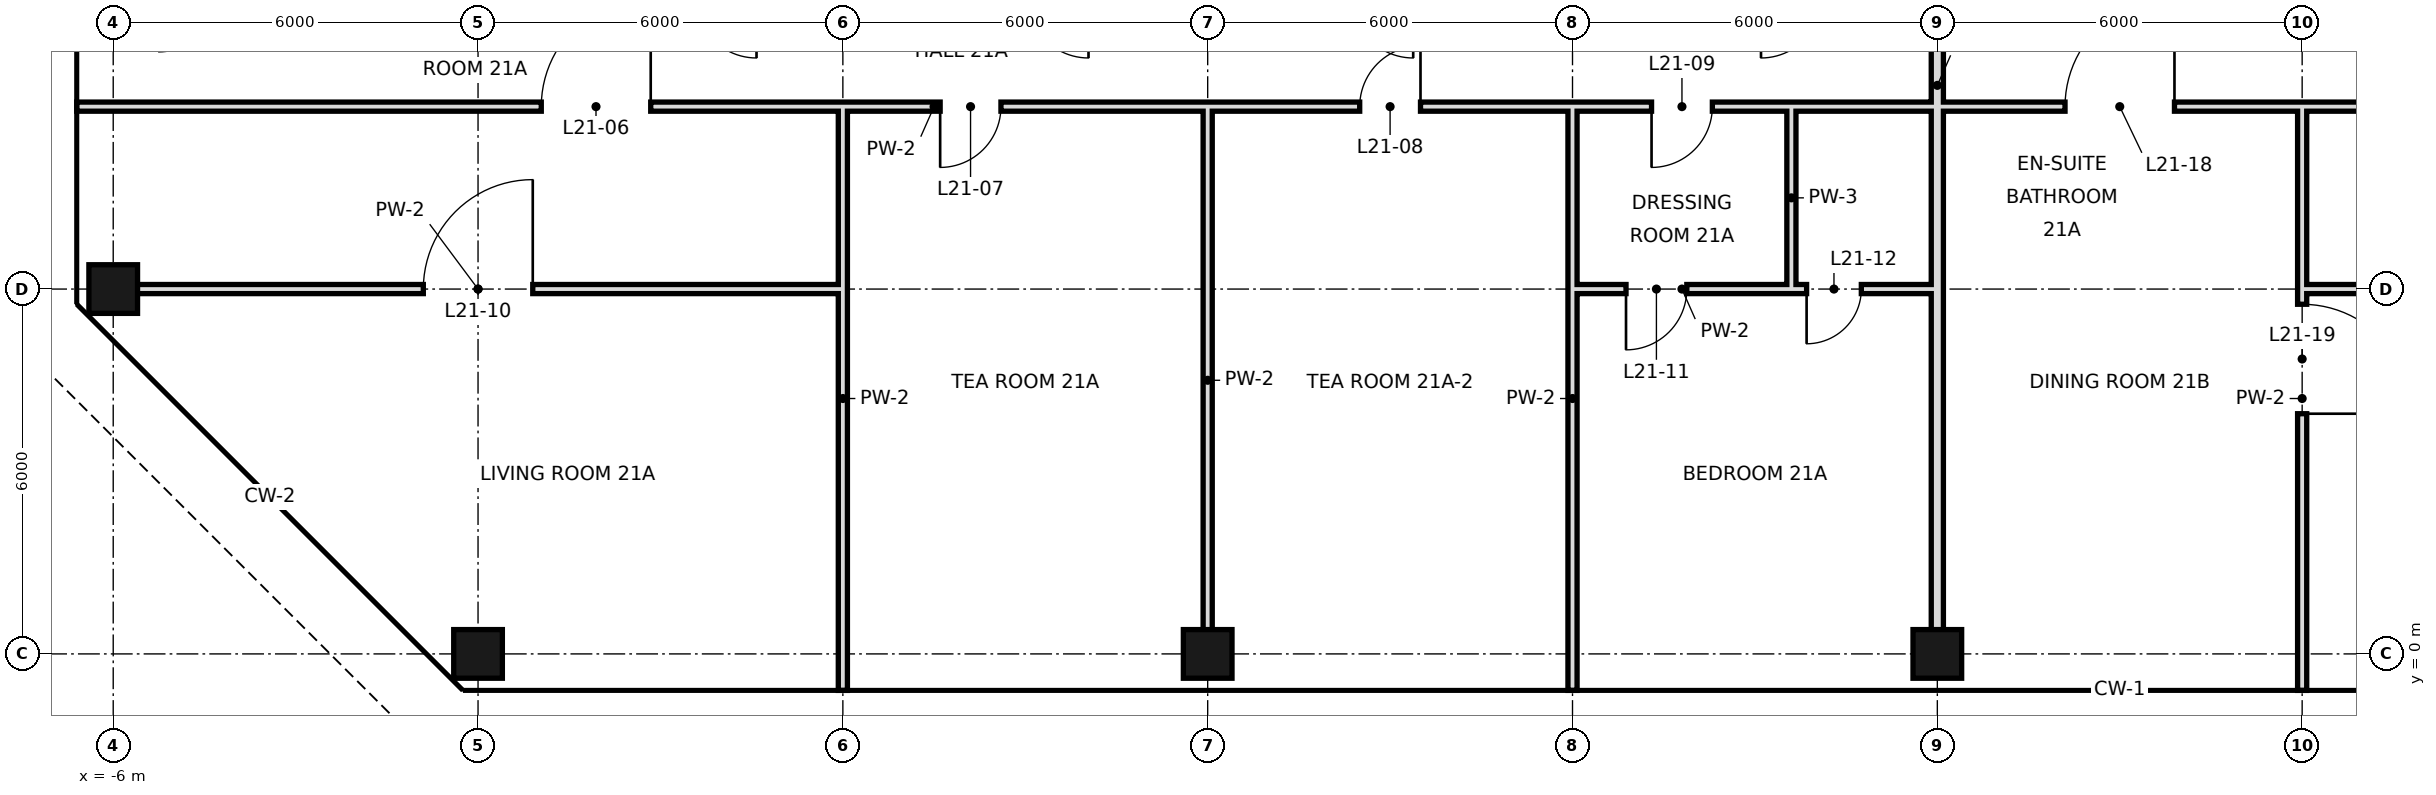
"""IFC4 building model, lengths in metres.
Left out: names, types, materials, properties, quantities, classifications, styles, units other than length and angle.
Written with IfcOpenShell. Run it as: python <this file> out.ifc"""

import sys

from ifc_helpers import new_model, si_unit, direction, frame, frame_2d, origin, origin_2d, place, context, subcontext, project, spatial, rectangle, hollow_rectangle, extrude, element, fill, save


model = new_model("IFC4")
c1 = context("Model", 3, precision=1e-05, world=origin(), true_north=direction((0.0, 1.0)))
c2 = subcontext(c1, "Body", "Model", "MODEL_VIEW")
j1 = project(units=[si_unit("LENGTHUNIT", "METRE"), si_unit("PLANEANGLEUNIT", "RADIAN")], contexts=[c1])
p1 = place(None, origin())
s1 = spatial("IfcSite", under=j1, at=p1, CompositionType="ELEMENT")
p2 = place(p1, origin())
s2 = spatial("IfcBuilding", under=s1, at=p2, CompositionType="ELEMENT")
p3 = place(p2, frame((0.0, 0.0, 99.8)))
s3 = spatial("IfcBuildingStorey", under=s2, at=p3, CompositionType="ELEMENT", Elevation=99.8)
for number, where, z_axis, x_axis in (
    (1, (-6.0, 6.0, 0.0), (0.0, 0.0, 1.0), (1.0, 0.0, 0.0)),
    (2, (0.0, 0.0, 0.0), (0.0, 0.0, 1.0), (1.0, 0.0, 0.0)),
    (3, (12.0, 0.0, 0.0), (0.0, 0.0, 1.0), (1.0, 0.0, 0.0)),
    (4, (24.0, 0.0, 0.0), (0.0, 0.0, 1.0), (1.0, 0.0, 0.0)),
):
    element("IfcColumn", number, at=place(p3, frame(where, z_axis=z_axis, x_axis=x_axis)), inside=s3, PredefinedType="COLUMN", context=c2, shape_type="SweptSolid", body=[
        extrude(hollow_rectangle(XDim=0.8, YDim=0.8, WallThickness=0.04, at=origin_2d()), origin(), (0.0, 0.0, 1.0), 3.6),
    ])
p4 = place(p3, frame((12.0, 0.0, 0.0), z_axis=(0.0, 0.0, 1.0), x_axis=(0.0, 1.0, 0.0)))
e5 = element("IfcWall", 5, at=p4, inside=s3, PredefinedType="PARTITIONING", context=c2, shape_type="SweptSolid", body=[
    extrude(rectangle(XDim=9.0, YDim=0.15, at=frame_2d((4.5, 0.0))), origin(), (0.0, 0.0, 1.0), 2.72),
])
p5 = place(p3, frame((18.0, -0.6, 0.0), z_axis=(0.0, 0.0, 1.0), x_axis=(0.0, 1.0, 0.0)))
e6 = element("IfcWall", 6, at=p5, inside=s3, PredefinedType="PARTITIONING", context=c2, shape_type="SweptSolid", body=[
    extrude(rectangle(XDim=9.6, YDim=0.15, at=frame_2d((4.8, 0.0))), origin(), (0.0, 0.0, 1.0), 2.72),
])
p6 = place(p3, frame((21.6, 6.0, 0.0), z_axis=(0.0, 0.0, 1.0), x_axis=(0.0, 1.0, 0.0)))
e7 = element("IfcWall", 7, at=p6, inside=s3, PredefinedType="PARTITIONING", context=c2, shape_type="SweptSolid", body=[
    extrude(rectangle(XDim=3.0, YDim=0.15, at=frame_2d((1.5, 0.0))), origin(), (0.0, 0.0, 1.0), 3.42),
])
p7 = place(p3, frame((24.0, 0.0, 0.0), z_axis=(0.0, 0.0, 1.0), x_axis=(0.0, 1.0, 0.0)))
e8 = element("IfcWall", 8, at=p7, inside=s3, PredefinedType="SOLIDWALL", context=c2, shape_type="SweptSolid", body=[
    extrude(rectangle(XDim=18.7, YDim=0.2, at=frame_2d((9.35, 0.0))), origin(), (0.0, 0.0, 1.0), 2.72),
])
p8 = place(p3, frame((30.0, -0.6, 0.0), z_axis=(0.0, 0.0, 1.0), x_axis=(0.0, 1.0, 0.0)))
e9 = element("IfcWall", 9, at=p8, inside=s3, PredefinedType="PARTITIONING", context=c2, shape_type="SweptSolid", body=[
    extrude(rectangle(XDim=9.6, YDim=0.15, at=frame_2d((4.8, 0.0))), origin(), (0.0, 0.0, 1.0), 3.42),
])
p9 = place(p8, frame((4.55, 0.0, 0.0)))
e10 = element("IfcOpeningElement", 10, at=p9, cuts=e9, PredefinedType="OPENING", context=c2, shape_type="SweptSolid", body=[
    extrude(rectangle(XDim=1.8, YDim=2.4, at=frame_2d((0.9, 1.2))), frame((0.0, 0.085, 0.0), z_axis=(0.0, -1.0, 0.0), x_axis=(1.0, 0.0, 0.0)), (0.0, 0.0, 1.0), 0.17),
])
p10 = place(p3, frame((6.0, -0.6, 0.0), z_axis=(0.0, 0.0, 1.0), x_axis=(0.0, 1.0, 0.0)))
e11 = element("IfcWall", 11, at=p10, inside=s3, PredefinedType="PARTITIONING", context=c2, shape_type="SweptSolid", body=[
    extrude(rectangle(XDim=9.6, YDim=0.15, at=frame_2d((4.8, 0.0))), origin(), (0.0, 0.0, 1.0), 2.72),
])
p11 = place(p3, frame((-6.0, 6.0, 0.0), z_axis=(0.0, 0.0, 1.0), x_axis=(1.0, 0.0, 0.0)))
e12 = element("IfcWall", 12, at=p11, inside=s3, PredefinedType="PARTITIONING", context=c2, shape_type="SweptSolid", body=[
    extrude(rectangle(XDim=12.0, YDim=0.15, at=frame_2d((6.0, 0.0))), origin(), (0.0, 0.0, 1.0), 2.97),
])
p12 = place(p11, frame((5.1, 0.0, 0.0)))
e13 = element("IfcOpeningElement", 13, at=p12, cuts=e12, PredefinedType="OPENING", context=c2, shape_type="SweptSolid", body=[
    extrude(rectangle(XDim=1.8, YDim=2.4, at=frame_2d((0.9, 1.2))), frame((0.0, 0.085, 0.0), z_axis=(0.0, -1.0, 0.0), x_axis=(1.0, 0.0, 0.0)), (0.0, 0.0, 1.0), 0.17),
])
p13 = place(p3, frame((18.0, 6.0, 0.0), z_axis=(0.0, 0.0, 1.0), x_axis=(1.0, 0.0, 0.0)))
e14 = element("IfcWall", 14, at=p13, inside=s3, PredefinedType="PARTITIONING", context=c2, shape_type="SweptSolid", body=[
    extrude(rectangle(XDim=3.6, YDim=0.15, at=frame_2d((1.8, 0.0))), origin(), (0.0, 0.0, 1.0), 2.97),
])
p14 = place(p13, frame((0.88, 0.0, 0.0)))
e15 = element("IfcOpeningElement", 15, at=p14, cuts=e14, PredefinedType="OPENING", context=c2, shape_type="SweptSolid", body=[
    extrude(rectangle(XDim=1.0, YDim=2.4, at=frame_2d((0.5, 1.2))), frame((0.0, 0.085, 0.0), z_axis=(0.0, -1.0, 0.0), x_axis=(1.0, 0.0, 0.0)), (0.0, 0.0, 1.0), 0.17),
])
p15 = place(p3, frame((30.0, 6.0, 0.0), z_axis=(0.0, 0.0, 1.0), x_axis=(1.0, 0.0, 0.0)))
e16 = element("IfcWall", 16, at=p15, inside=s3, PredefinedType="PARTITIONING", context=c2, shape_type="SweptSolid", body=[
    extrude(rectangle(XDim=12.0, YDim=0.15, at=frame_2d((6.0, 0.0))), origin(), (0.0, 0.0, 1.0), 2.72),
])
p16 = place(p3, frame((21.6, 6.0, 0.0), z_axis=(0.0, 0.0, 1.0), x_axis=(1.0, 0.0, 0.0)))
e17 = element("IfcWall", 17, at=p16, inside=s3, PredefinedType="PARTITIONING", context=c2, shape_type="SweptSolid", body=[
    extrude(rectangle(XDim=2.4, YDim=0.15, at=frame_2d((1.2, 0.0))), origin(), (0.0, 0.0, 1.0), 2.97),
])
p17 = place(p16, frame((0.25, 0.0, 0.0)))
e18 = element("IfcOpeningElement", 18, at=p17, cuts=e17, PredefinedType="OPENING", context=c2, shape_type="SweptSolid", body=[
    extrude(rectangle(XDim=0.9, YDim=2.4, at=frame_2d((0.45, 1.2))), frame((0.0, 0.085, 0.0), z_axis=(0.0, -1.0, 0.0), x_axis=(1.0, 0.0, 0.0)), (0.0, 0.0, 1.0), 0.17),
])
p18 = place(p3, frame((-6.6, 9.0, 0.0), z_axis=(0.0, 0.0, 1.0), x_axis=(1.0, 0.0, 0.0)))
e19 = element("IfcWall", 19, at=p18, inside=s3, PredefinedType="PARTITIONING", context=c2, shape_type="SweptSolid", body=[
    extrude(rectangle(XDim=28.2, YDim=0.15, at=frame_2d((14.1, 0.0))), origin(), (0.0, 0.0, 1.0), 3.42),
])
p19 = place(p18, frame((7.64, 0.0, 0.0)))
e20 = element("IfcOpeningElement", 20, at=p19, cuts=e19, PredefinedType="OPENING", context=c2, shape_type="SweptSolid", body=[
    extrude(rectangle(XDim=1.8, YDim=2.4, at=frame_2d((0.9, 1.2))), frame((0.0, 0.085, 0.0), z_axis=(0.0, -1.0, 0.0), x_axis=(1.0, 0.0, 0.0)), (0.0, 0.0, 1.0), 0.17),
])
p20 = place(p18, frame((14.2, 0.0, 0.0)))
e21 = element("IfcOpeningElement", 21, at=p20, cuts=e19, PredefinedType="OPENING", context=c2, shape_type="SweptSolid", body=[
    extrude(rectangle(XDim=1.0, YDim=2.4, at=frame_2d((0.5, 1.2))), frame((0.0, 0.085, 0.0), z_axis=(0.0, -1.0, 0.0), x_axis=(1.0, 0.0, 0.0)), (0.0, 0.0, 1.0), 0.17),
])
p21 = place(p18, frame((21.1, 0.0, 0.0)))
e22 = element("IfcOpeningElement", 22, at=p21, cuts=e19, PredefinedType="OPENING", context=c2, shape_type="SweptSolid", body=[
    extrude(rectangle(XDim=1.0, YDim=2.4, at=frame_2d((0.5, 1.2))), frame((0.0, 0.085, 0.0), z_axis=(0.0, -1.0, 0.0), x_axis=(1.0, 0.0, 0.0)), (0.0, 0.0, 1.0), 0.17),
])
p22 = place(p18, frame((25.9, 0.0, 0.0)))
e23 = element("IfcOpeningElement", 23, at=p22, cuts=e19, PredefinedType="OPENING", context=c2, shape_type="SweptSolid", body=[
    extrude(rectangle(XDim=1.0, YDim=2.4, at=frame_2d((0.5, 1.2))), frame((0.0, 0.085, 0.0), z_axis=(0.0, -1.0, 0.0), x_axis=(1.0, 0.0, 0.0)), (0.0, 0.0, 1.0), 0.17),
])
p23 = place(p3, frame((24.0, 9.0, 0.0), z_axis=(0.0, 0.0, 1.0), x_axis=(1.0, 0.0, 0.0)))
e24 = element("IfcWall", 24, at=p23, inside=s3, PredefinedType="PARTITIONING", context=c2, shape_type="SweptSolid", body=[
    extrude(rectangle(XDim=18.0, YDim=0.15, at=frame_2d((9.0, 0.0))), origin(), (0.0, 0.0, 1.0), 3.42),
])
p24 = place(p23, frame((2.1, 0.0, 0.0)))
e25 = element("IfcOpeningElement", 25, at=p24, cuts=e24, PredefinedType="OPENING", context=c2, shape_type="SweptSolid", body=[
    extrude(rectangle(XDim=1.8, YDim=2.4, at=frame_2d((0.9, 1.2))), frame((0.0, 0.085, 0.0), z_axis=(0.0, -1.0, 0.0), x_axis=(1.0, 0.0, 0.0)), (0.0, 0.0, 1.0), 0.17),
])
p25 = place(p23, frame((9.16, 0.0, 0.0)))
e26 = element("IfcOpeningElement", 26, at=p25, cuts=e24, PredefinedType="OPENING", context=c2, shape_type="SweptSolid", body=[
    extrude(rectangle(XDim=1.8, YDim=2.4, at=frame_2d((0.9, 1.2))), frame((0.0, 0.085, 0.0), z_axis=(0.0, -1.0, 0.0), x_axis=(1.0, 0.0, 0.0)), (0.0, 0.0, 1.0), 0.17),
])
p26 = place(p3, frame((21.6, 9.0, 0.0), z_axis=(0.0, 0.0, 1.0), x_axis=(1.0, 0.0, 0.0)))
e27 = element("IfcWall", 27, at=p26, inside=s3, PredefinedType="PARTITIONING", context=c2, shape_type="SweptSolid", body=[
    extrude(rectangle(XDim=2.4, YDim=0.15, at=frame_2d((1.2, 0.0))), origin(), (0.0, 0.0, 1.0), 3.42),
])
p27 = place(p19, frame((1.8, 0.0, 0.0), z_axis=(0.0, 0.0, 1.0), x_axis=(-1.0, 0.0, 0.0)))
e28 = element("IfcDoor", 28, at=p27, inside=s3, OperationType="SINGLE_SWING_LEFT", PredefinedType="DOOR", context=c2, shape_type="SweptSolid", body=[
    extrude(rectangle(XDim=1.8, YDim=2.4, at=frame_2d((0.9, 1.2))), frame((0.0, 0.025, 0.0), z_axis=(0.0, -1.0, 0.0), x_axis=(1.0, 0.0, 0.0)), (0.0, 0.0, 1.0), 0.05),
])
fill(e20, e28)
p28 = place(p20, frame((1.0, 0.0, 0.0), z_axis=(0.0, 0.0, 1.0), x_axis=(-1.0, 0.0, 0.0)))
e29 = element("IfcDoor", 29, at=p28, inside=s3, OperationType="SINGLE_SWING_RIGHT", PredefinedType="DOOR", context=c2, shape_type="SweptSolid", body=[
    extrude(rectangle(XDim=1.0, YDim=2.4, at=frame_2d((0.5, 1.2))), frame((0.0, 0.025, 0.0), z_axis=(0.0, -1.0, 0.0), x_axis=(1.0, 0.0, 0.0)), (0.0, 0.0, 1.0), 0.05),
])
fill(e21, e29)
p29 = place(p21, frame((1.0, 0.0, 0.0), z_axis=(0.0, 0.0, 1.0), x_axis=(-1.0, 0.0, 0.0)))
e30 = element("IfcDoor", 30, at=p29, inside=s3, OperationType="SINGLE_SWING_LEFT", PredefinedType="DOOR", context=c2, shape_type="SweptSolid", body=[
    extrude(rectangle(XDim=1.0, YDim=2.4, at=frame_2d((0.5, 1.2))), frame((0.0, 0.025, 0.0), z_axis=(0.0, -1.0, 0.0), x_axis=(1.0, 0.0, 0.0)), (0.0, 0.0, 1.0), 0.05),
])
fill(e22, e30)
p30 = place(p22, frame((1.0, 0.0, 0.0), z_axis=(0.0, 0.0, 1.0), x_axis=(-1.0, 0.0, 0.0)))
e31 = element("IfcDoor", 31, at=p30, inside=s3, OperationType="SINGLE_SWING_RIGHT", PredefinedType="DOOR", context=c2, shape_type="SweptSolid", body=[
    extrude(rectangle(XDim=1.0, YDim=2.4, at=frame_2d((0.5, 1.2))), frame((0.0, 0.025, 0.0), z_axis=(0.0, -1.0, 0.0), x_axis=(1.0, 0.0, 0.0)), (0.0, 0.0, 1.0), 0.05),
])
fill(e23, e31)
p31 = place(p12, frame((1.8, 0.0, 0.0), z_axis=(0.0, 0.0, 1.0), x_axis=(-1.0, 0.0, 0.0)))
e32 = element("IfcDoor", 32, at=p31, inside=s3, OperationType="SINGLE_SWING_LEFT", PredefinedType="DOOR", context=c2, shape_type="SweptSolid", body=[
    extrude(rectangle(XDim=1.8, YDim=2.4, at=frame_2d((0.9, 1.2))), frame((0.0, 0.025, 0.0), z_axis=(0.0, -1.0, 0.0), x_axis=(1.0, 0.0, 0.0)), (0.0, 0.0, 1.0), 0.05),
])
fill(e13, e32)
p32 = place(p14, frame((1.0, 0.0, 0.0), z_axis=(0.0, 0.0, 1.0), x_axis=(-1.0, 0.0, 0.0)))
e33 = element("IfcDoor", 33, at=p32, inside=s3, OperationType="SINGLE_SWING_RIGHT", PredefinedType="DOOR", context=c2, shape_type="SweptSolid", body=[
    extrude(rectangle(XDim=1.0, YDim=2.4, at=frame_2d((0.5, 1.2))), frame((0.0, 0.025, 0.0), z_axis=(0.0, -1.0, 0.0), x_axis=(1.0, 0.0, 0.0)), (0.0, 0.0, 1.0), 0.05),
])
fill(e15, e33)
p33 = place(p17, frame((0.9, 0.0, 0.0), z_axis=(0.0, 0.0, 1.0), x_axis=(-1.0, 0.0, 0.0)))
e34 = element("IfcDoor", 34, at=p33, inside=s3, OperationType="SINGLE_SWING_RIGHT", PredefinedType="DOOR", context=c2, shape_type="SweptSolid", body=[
    extrude(rectangle(XDim=0.9, YDim=2.4, at=frame_2d((0.45, 1.2))), frame((0.0, 0.025, 0.0), z_axis=(0.0, -1.0, 0.0), x_axis=(1.0, 0.0, 0.0)), (0.0, 0.0, 1.0), 0.05),
])
fill(e18, e34)
p34 = place(p24, frame((1.8, 0.0, 0.0), z_axis=(0.0, 0.0, 1.0), x_axis=(-1.0, 0.0, 0.0)))
e35 = element("IfcDoor", 35, at=p34, inside=s3, OperationType="SINGLE_SWING_LEFT", PredefinedType="DOOR", context=c2, shape_type="SweptSolid", body=[
    extrude(rectangle(XDim=1.8, YDim=2.4, at=frame_2d((0.9, 1.2))), frame((0.0, 0.025, 0.0), z_axis=(0.0, -1.0, 0.0), x_axis=(1.0, 0.0, 0.0)), (0.0, 0.0, 1.0), 0.05),
])
fill(e25, e35)
p35 = place(p9, frame((1.8, 0.0, 0.0), z_axis=(0.0, 0.0, 1.0), x_axis=(-1.0, 0.0, 0.0)))
e36 = element("IfcDoor", 36, at=p35, inside=s3, OperationType="SINGLE_SWING_RIGHT", PredefinedType="DOOR", context=c2, shape_type="SweptSolid", body=[
    extrude(rectangle(XDim=1.8, YDim=2.4, at=frame_2d((0.9, 1.2))), frame((0.0, 0.025, 0.0), z_axis=(0.0, -1.0, 0.0), x_axis=(1.0, 0.0, 0.0)), (0.0, 0.0, 1.0), 0.05),
])
fill(e10, e36)
save(model, sys.argv[1])
